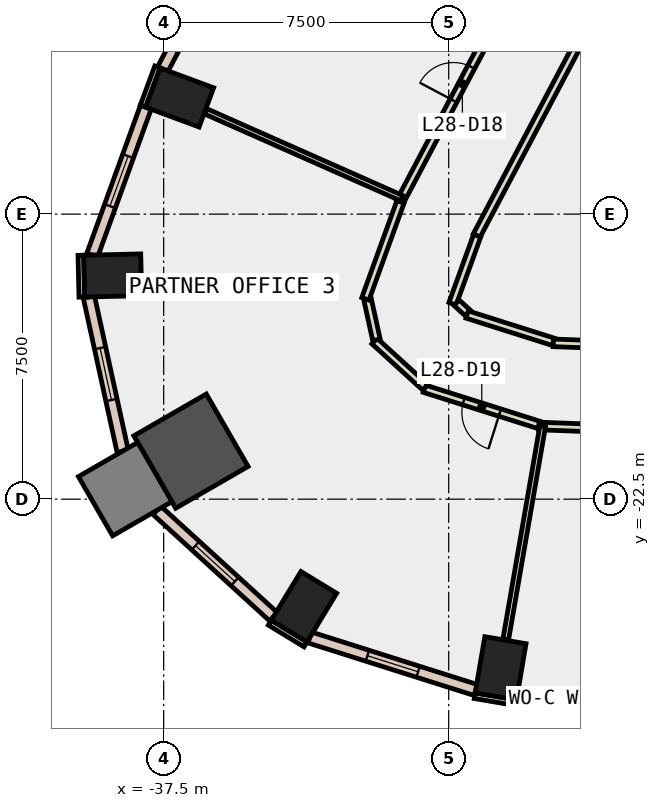
"""IFC4 building model, lengths in metres.
Left out: names, types, materials, properties, quantities, classifications, styles, units other than length and angle.
Written with IfcOpenShell. Run it as: python <this file> out.ifc"""

import sys

from ifc_helpers import new_model, si_unit, direction, frame, frame_2d, origin, origin_2d, place, context, subcontext, project, spatial, rectangle, extrude, element, fill, save


model = new_model("IFC4")
c1 = context("Model", 3, precision=1e-05, world=origin(), true_north=direction((0.0, 1.0)))
c2 = subcontext(c1, "Body", "Model", "MODEL_VIEW")
j1 = project(units=[si_unit("LENGTHUNIT", "METRE"), si_unit("PLANEANGLEUNIT", "RADIAN")], contexts=[c1])
p1 = place(None, origin())
s1 = spatial("IfcSite", under=j1, at=p1, CompositionType="ELEMENT")
p2 = place(p1, origin())
s2 = spatial("IfcBuilding", under=s1, at=p2, CompositionType="ELEMENT")
p3 = place(p2, frame((0.0, 0.0, 128.6)))
s3 = spatial("IfcBuildingStorey", under=s2, at=p3, CompositionType="ELEMENT", Elevation=128.6)
for number, where, z_axis, x_axis in (
    (1, (-28.633, -26.95, -0.4), (0.0, 0.0, 1.0), (-0.986, 0.168, 0.0)),
    (2, (-37.08, -11.931, -0.4), (0.0, 0.0, 1.0), (0.347, 0.938, 0.0)),
    (3, (-38.841, -16.614, -0.4), (0.0, 0.0, 1.0), (-0.023, 1.0, 0.0)),
):
    element("IfcColumn", number, at=place(p3, frame(where, z_axis=z_axis, x_axis=x_axis)), inside=s3, PredefinedType="COLUMN", context=c2, shape_type="SweptSolid", body=[
        extrude(rectangle(XDim=1.1, YDim=1.5, at=origin_2d()), origin(), (0.0, 0.0, 1.0), 4.0),
    ])
p4 = place(p3, frame((-36.781, -21.236, -0.4), z_axis=(0.0, 0.0, 1.0), x_axis=(0.866025403784, 0.5, 0.0)))
e4 = element("IfcColumn", 4, at=p4, inside=s3, PredefinedType="COLUMN", context=c2, shape_type="SweptSolid", body=[
    extrude(rectangle(XDim=2.2, YDim=2.2, at=origin_2d()), origin(), (0.0, 0.0, 1.0), 4.0),
])
p5 = place(p3, frame((-33.808, -25.331, -0.4), z_axis=(0.0, 0.0, 1.0), x_axis=(-0.854095929175, 0.520115510024, 0.0)))
e5 = element("IfcColumn", 5, at=p5, inside=s3, PredefinedType="COLUMN", context=c2, shape_type="SweptSolid", body=[
    extrude(rectangle(XDim=1.1, YDim=1.5, at=origin_2d()), origin(), (0.0, 0.0, 1.0), 4.0),
])
p6 = place(p3, frame((-38.513, -22.236, -0.4), z_axis=(0.0, 0.0, 1.0), x_axis=(0.866025403784, 0.5, 0.0)))
e6 = element("IfcColumn", 6, at=p6, inside=s3, PredefinedType="COLUMN", context=c2, shape_type="SweptSolid", body=[
    extrude(rectangle(XDim=1.8, YDim=1.8, at=origin_2d()), origin(), (0.0, 0.0, 1.0), 4.0),
])
p7 = place(p3, frame((-37.663, -11.128, 0.0), z_axis=(0.0, 0.0, 1.0), x_axis=(-0.347010833361, -0.937861120598, 0.0)))
e7 = element("IfcWall", 7, at=p7, inside=s3, PredefinedType="STANDARD", context=c2, shape_type="SweptSolid", body=[
    extrude(rectangle(XDim=1.1, YDim=0.15, at=frame_2d((0.55, 0.0))), origin(), (0.0, 0.0, 1.0), 3.6),
])
p8 = place(p3, frame((-29.314, -27.671, 0.0), z_axis=(0.0, 0.0, 1.0), x_axis=(0.985763338892, -0.168138751323, 0.0)))
e8 = element("IfcWall", 8, at=p8, inside=s3, PredefinedType="STANDARD", context=c2, shape_type="SweptSolid", body=[
    extrude(rectangle(XDim=1.101, YDim=0.15, at=frame_2d((0.55, 0.0))), origin(), (0.0, 0.0, 1.0), 3.6),
])
for number, where, z_axis, x_axis in (
    (9, (-39.679, -16.083, 0.0), (0.0, 0.0, 1.0), (0.024, -1.0, 0.0)),
    (10, (-34.707, -25.75, 0.0), (0.0, 0.0, 1.0), (0.854, -0.52, 0.0)),
):
    element("IfcWall", number, at=place(p3, frame(where, z_axis=z_axis, x_axis=x_axis)), inside=s3, PredefinedType="STANDARD", context=c2, shape_type="SweptSolid", body=[
        extrude(rectangle(XDim=1.1, YDim=0.15, at=frame_2d((0.55, 0.0))), origin(), (0.0, 0.0, 1.0), 3.6),
    ])
p9 = place(p3, frame((-28.205, -27.708, 0.0), z_axis=(0.0, 0.0, 1.0), x_axis=(0.999317846462, -0.036930228031, 0.0)))
e11 = element("IfcWall", 11, at=p9, inside=s3, PredefinedType="STANDARD", context=c2, shape_type="SweptSolid", body=[
    extrude(rectangle(XDim=5.877, YDim=0.3, at=frame_2d((2.938, 0.0))), origin(), (0.0, 0.0, 1.0), 3.6),
])
p10 = place(p9, frame((0.469, 0.0, 0.9)))
e12 = element("IfcOpeningElement", 12, at=p10, cuts=e11, PredefinedType="OPENING", context=c2, shape_type="SweptSolid", body=[
    extrude(rectangle(XDim=2.0, YDim=2.6, at=frame_2d((1.0, 1.3))), frame((0.0, 0.16, 0.0), z_axis=(0.0, -1.0, 0.0), x_axis=(1.0, 0.0, 0.0)), (0.0, 0.0, 1.0), 0.32),
])
p11 = place(p9, frame((3.408, 0.0, 0.9)))
e13 = element("IfcOpeningElement", 13, at=p11, cuts=e11, PredefinedType="OPENING", context=c2, shape_type="SweptSolid", body=[
    extrude(rectangle(XDim=2.0, YDim=2.6, at=frame_2d((1.0, 1.3))), frame((0.0, 0.16, 0.0), z_axis=(0.0, -1.0, 0.0), x_axis=(1.0, 0.0, 0.0)), (0.0, 0.0, 1.0), 0.32),
])
p12 = place(p3, frame((-34.593, -5.643, 0.0), z_axis=(0.0, 0.0, 1.0), x_axis=(-0.467654949391, -0.883911108828, 0.0)))
e14 = element("IfcWall", 14, at=p12, inside=s3, PredefinedType="STANDARD", context=c2, shape_type="SweptSolid", body=[
    extrude(rectangle(XDim=6.265, YDim=0.3, at=frame_2d((3.133, 0.0))), origin(), (0.0, 0.0, 1.0), 3.6),
])
p13 = place(p12, frame((0.566, 0.0, 0.9)))
e15 = element("IfcOpeningElement", 15, at=p13, cuts=e14, PredefinedType="OPENING", context=c2, shape_type="SweptSolid", body=[
    extrude(rectangle(XDim=2.0, YDim=2.6, at=frame_2d((1.0, 1.3))), frame((0.0, 0.16, 0.0), z_axis=(0.0, -1.0, 0.0), x_axis=(1.0, 0.0, 0.0)), (0.0, 0.0, 1.0), 0.32),
])
p14 = place(p12, frame((3.699, 0.0, 0.9)))
e16 = element("IfcOpeningElement", 16, at=p14, cuts=e14, PredefinedType="OPENING", context=c2, shape_type="SweptSolid", body=[
    extrude(rectangle(XDim=2.0, YDim=2.6, at=frame_2d((1.0, 1.3))), frame((0.0, 0.16, 0.0), z_axis=(0.0, -1.0, 0.0), x_axis=(1.0, 0.0, 0.0)), (0.0, 0.0, 1.0), 0.32),
])
p15 = place(p3, frame((-37.97, -12.186, 0.0), z_axis=(0.0, 0.0, 1.0), x_axis=(-0.340477955209, -0.940252499075, 0.0)))
e17 = element("IfcWall", 17, at=p15, inside=s3, PredefinedType="STANDARD", context=c2, shape_type="SweptSolid", body=[
    extrude(rectangle(XDim=4.138, YDim=0.3, at=frame_2d((2.069, 0.0))), origin(), (0.0, 0.0, 1.0), 3.6),
])
p16 = place(p15, frame((1.369, 0.0, 0.9)))
e18 = element("IfcOpeningElement", 18, at=p16, cuts=e17, PredefinedType="OPENING", context=c2, shape_type="SweptSolid", body=[
    extrude(rectangle(XDim=1.4, YDim=2.6, at=frame_2d((0.7, 1.3))), frame((0.0, 0.16, 0.0), z_axis=(0.0, -1.0, 0.0), x_axis=(1.0, 0.0, 0.0)), (0.0, 0.0, 1.0), 0.32),
])
p17 = place(p3, frame((-39.468, -17.178, 0.0), z_axis=(0.0, 0.0, 1.0), x_axis=(0.2139737857, -0.976839402887, 0.0)))
e19 = element("IfcWall", 19, at=p17, inside=s3, PredefinedType="STANDARD", context=c2, shape_type="SweptSolid", body=[
    extrude(rectangle(XDim=4.154, YDim=0.3, at=frame_2d((2.077, 0.0))), origin(), (0.0, 0.0, 1.0), 3.6),
])
p18 = place(p17, frame((1.377, 0.0, 0.9)))
e20 = element("IfcOpeningElement", 20, at=p18, cuts=e19, PredefinedType="OPENING", context=c2, shape_type="SweptSolid", body=[
    extrude(rectangle(XDim=1.4, YDim=2.6, at=frame_2d((0.7, 1.3))), frame((0.0, 0.16, 0.0), z_axis=(0.0, -1.0, 0.0), x_axis=(1.0, 0.0, 0.0)), (0.0, 0.0, 1.0), 0.32),
])
p19 = place(p3, frame((-37.68, -22.793, 0.0), z_axis=(0.0, 0.0, 1.0), x_axis=(0.738825046606, -0.673897284835, 0.0)))
e21 = element("IfcWall", 21, at=p19, inside=s3, PredefinedType="STANDARD", context=c2, shape_type="SweptSolid", body=[
    extrude(rectangle(XDim=4.155, YDim=0.3, at=frame_2d((2.078, 0.0))), origin(), (0.0, 0.0, 1.0), 3.6),
])
p20 = place(p19, frame((1.378, 0.0, 0.9)))
e22 = element("IfcOpeningElement", 22, at=p20, cuts=e21, PredefinedType="OPENING", context=c2, shape_type="SweptSolid", body=[
    extrude(rectangle(XDim=1.4, YDim=2.6, at=frame_2d((0.7, 1.3))), frame((0.0, 0.16, 0.0), z_axis=(0.0, -1.0, 0.0), x_axis=(1.0, 0.0, 0.0)), (0.0, 0.0, 1.0), 0.32),
])
p21 = place(p3, frame((-33.657, -26.139, 0.0), z_axis=(0.0, 0.0, 1.0), x_axis=(0.953449736988, -0.301551983971, 0.0)))
e23 = element("IfcWall", 23, at=p21, inside=s3, PredefinedType="STANDARD", context=c2, shape_type="SweptSolid", body=[
    extrude(rectangle(XDim=4.583, YDim=0.3, at=frame_2d((2.292, 0.0))), origin(), (0.0, 0.0, 1.0), 3.6),
])
p22 = place(p21, frame((1.592, 0.0, 0.9)))
e24 = element("IfcOpeningElement", 24, at=p22, cuts=e23, PredefinedType="OPENING", context=c2, shape_type="SweptSolid", body=[
    extrude(rectangle(XDim=1.4, YDim=2.6, at=frame_2d((0.7, 1.3))), frame((0.0, 0.16, 0.0), z_axis=(0.0, -1.0, 0.0), x_axis=(1.0, 0.0, 0.0)), (0.0, 0.0, 1.0), 0.32),
])
p23 = place(p3, frame((-26.095, -9.574, 0.0), z_axis=(0.0, 0.0, 1.0), x_axis=(-0.467631129673, -0.883923710826, 0.0)))
e25 = element("IfcWall", 25, at=p23, inside=s3, PredefinedType="PARTITIONING", context=c2, shape_type="SweptSolid", body=[
    extrude(rectangle(XDim=6.777, YDim=0.2, at=frame_2d((3.388, 0.0))), origin(), (0.0, 0.0, 1.0), 3.6),
])
p24 = place(p3, frame((-29.251, -15.569, 0.0), z_axis=(0.0, 0.0, 1.0), x_axis=(-0.340403936609, -0.940279298901, 0.0)))
e26 = element("IfcWall", 26, at=p24, inside=s3, PredefinedType="PARTITIONING", context=c2, shape_type="SweptSolid", body=[
    extrude(rectangle(XDim=1.904, YDim=0.2, at=frame_2d((0.952, 0.0))), origin(), (0.0, 0.0, 1.0), 3.6),
])
p25 = place(p3, frame((-29.792, -17.332, 0.0), z_axis=(0.0, 0.0, 1.0), x_axis=(0.738629069284, -0.674112081192, 0.0)))
e27 = element("IfcWall", 27, at=p25, inside=s3, PredefinedType="PARTITIONING", context=c2, shape_type="SweptSolid", body=[
    extrude(rectangle(XDim=0.405, YDim=0.2, at=frame_2d((0.202, 0.0))), origin(), (0.0, 0.0, 1.0), 3.6),
])
p26 = place(p3, frame((-29.514, -17.642, 0.0), z_axis=(0.0, 0.0, 1.0), x_axis=(0.953398231748, -0.301714785353, 0.0)))
e28 = element("IfcWall", 28, at=p26, inside=s3, PredefinedType="PARTITIONING", context=c2, shape_type="SweptSolid", body=[
    extrude(rectangle(XDim=2.383, YDim=0.2, at=frame_2d((1.191, 0.0))), origin(), (0.0, 0.0, 1.0), 3.6),
])
p27 = place(p3, frame((-27.247, -18.387, 0.0), z_axis=(0.0, 0.0, 1.0), x_axis=(0.999316109669, -0.036977195089, 0.0)))
e29 = element("IfcWall", 29, at=p27, inside=s3, PredefinedType="PARTITIONING", context=c2, shape_type="SweptSolid", body=[
    extrude(rectangle(XDim=5.764, YDim=0.2, at=frame_2d((2.882, 0.0))), origin(), (0.0, 0.0, 1.0), 3.6),
])
p28 = place(p3, frame((-31.28, -14.67, 0.0), z_axis=(0.0, 0.0, 1.0), x_axis=(0.4676622466, 0.883907248022, 0.0)))
e30 = element("IfcWall", 30, at=p28, inside=s3, PredefinedType="PARTITIONING", context=c2, shape_type="SweptSolid", body=[
    extrude(rectangle(XDim=6.866, YDim=0.2, at=frame_2d((3.433, 0.0))), origin(), (0.0, 0.0, 1.0), 3.6),
])
p29 = place(p28, frame((3.008, 0.0, 0.0)))
e31 = element("IfcOpeningElement", 31, at=p29, cuts=e30, PredefinedType="OPENING", context=c2, shape_type="SweptSolid", body=[
    extrude(rectangle(XDim=1.0, YDim=2.1, at=frame_2d((0.5, 1.05))), frame((0.0, 0.11, 0.0), z_axis=(0.0, -1.0, 0.0), x_axis=(1.0, 0.0, 0.0)), (0.0, 0.0, 1.0), 0.22),
])
p30 = place(p3, frame((-27.621, -20.548, 0.0), z_axis=(0.0, 0.0, 1.0), x_axis=(-0.953482354465, 0.301448834338, 0.0)))
e32 = element("IfcWall", 32, at=p30, inside=s3, PredefinedType="PARTITIONING", context=c2, shape_type="SweptSolid", body=[
    extrude(rectangle(XDim=3.165, YDim=0.2, at=frame_2d((1.583, 0.0))), origin(), (0.0, 0.0, 1.0), 3.6),
])
p31 = place(p30, frame((1.082, 0.0, 0.0)))
e33 = element("IfcOpeningElement", 33, at=p31, cuts=e32, PredefinedType="OPENING", context=c2, shape_type="SweptSolid", body=[
    extrude(rectangle(XDim=1.0, YDim=2.1, at=frame_2d((0.5, 1.05))), frame((0.0, 0.11, 0.0), z_axis=(0.0, -1.0, 0.0), x_axis=(1.0, 0.0, 0.0)), (0.0, 0.0, 1.0), 0.22),
])
p32 = place(p3, frame((-30.617, -19.557, 0.0), z_axis=(0.0, 0.0, 1.0), x_axis=(-0.739034946694, 0.673667089567, 0.0)))
e34 = element("IfcWall", 34, at=p32, inside=s3, PredefinedType="PARTITIONING", context=c2, shape_type="SweptSolid", body=[
    extrude(rectangle(XDim=1.808, YDim=0.2, at=frame_2d((0.904, 0.0))), origin(), (0.0, 0.0, 1.0), 3.6),
])
p33 = place(p3, frame((-31.901, -18.308, 0.0), z_axis=(0.0, 0.0, 1.0), x_axis=(-0.214278387947, 0.976772630891, 0.0)))
e35 = element("IfcWall", 35, at=p33, inside=s3, PredefinedType="PARTITIONING", context=c2, shape_type="SweptSolid", body=[
    extrude(rectangle(XDim=1.102, YDim=0.2, at=frame_2d((0.551, 0.0))), origin(), (0.0, 0.0, 1.0), 3.6),
])
p34 = place(p3, frame((-32.192, -17.229, 0.0), z_axis=(0.0, 0.0, 1.0), x_axis=(0.340269739222, 0.940327870782, 0.0)))
e36 = element("IfcWall", 36, at=p34, inside=s3, PredefinedType="PARTITIONING", context=c2, shape_type="SweptSolid", body=[
    extrude(rectangle(XDim=2.715, YDim=0.2, at=frame_2d((1.357, 0.0))), origin(), (0.0, 0.0, 1.0), 3.6),
])
p35 = place(p3, frame((-21.557, -20.799, 0.0), z_axis=(0.0, 0.0, 1.0), x_axis=(-0.99931884782, 0.036903121698, 0.0)))
e37 = element("IfcWall", 37, at=p35, inside=s3, PredefinedType="PARTITIONING", context=c2, shape_type="SweptSolid", body=[
    extrude(rectangle(XDim=6.073, YDim=0.2, at=frame_2d((3.037, 0.0))), origin(), (0.0, 0.0, 1.0), 3.6),
])
p36 = place(p3, frame((-31.233, -14.582, 0.0), z_axis=(0.0, 0.0, 1.0), x_axis=(-0.914317360249, 0.404998474994, 0.0)))
e38 = element("IfcWall", 38, at=p36, inside=s3, PredefinedType="PARTITIONING", context=c2, shape_type="SweptSolid", body=[
    extrude(rectangle(XDim=5.645, YDim=0.15, at=frame_2d((2.822, 0.0))), origin(), (0.0, 0.0, 1.0), 3.6),
])
p37 = place(p3, frame((-27.526, -20.578, 0.0), z_axis=(0.0, 0.0, 1.0), x_axis=(-0.170795043313, -0.985306578269, 0.0)))
e39 = element("IfcWall", 39, at=p37, inside=s3, PredefinedType="PARTITIONING", context=c2, shape_type="SweptSolid", body=[
    extrude(rectangle(XDim=5.698, YDim=0.15, at=frame_2d((2.849, 0.0))), origin(), (0.0, 0.0, 1.0), 3.6),
])
p38 = place(p10, origin())
e40 = element("IfcWindow", 40, at=p38, inside=s3, PartitioningType="SINGLE_PANEL", PredefinedType="WINDOW", context=c2, shape_type="SweptSolid", body=[
    extrude(rectangle(XDim=2.0, YDim=2.6, at=frame_2d((1.0, 1.3))), frame((0.0, 0.03, 0.0), z_axis=(0.0, -1.0, 0.0), x_axis=(1.0, 0.0, 0.0)), (0.0, 0.0, 1.0), 0.06),
])
fill(e12, e40)
p39 = place(p16, origin())
e41 = element("IfcWindow", 41, at=p39, inside=s3, PartitioningType="SINGLE_PANEL", PredefinedType="WINDOW", context=c2, shape_type="SweptSolid", body=[
    extrude(rectangle(XDim=1.4, YDim=2.6, at=frame_2d((0.7, 1.3))), frame((0.0, 0.03, 0.0), z_axis=(0.0, -1.0, 0.0), x_axis=(1.0, 0.0, 0.0)), (0.0, 0.0, 1.0), 0.06),
])
fill(e18, e41)
p40 = place(p18, origin())
e42 = element("IfcWindow", 42, at=p40, inside=s3, PartitioningType="SINGLE_PANEL", PredefinedType="WINDOW", context=c2, shape_type="SweptSolid", body=[
    extrude(rectangle(XDim=1.4, YDim=2.6, at=frame_2d((0.7, 1.3))), frame((0.0, 0.03, 0.0), z_axis=(0.0, -1.0, 0.0), x_axis=(1.0, 0.0, 0.0)), (0.0, 0.0, 1.0), 0.06),
])
fill(e20, e42)
p41 = place(p20, origin())
e43 = element("IfcWindow", 43, at=p41, inside=s3, PartitioningType="SINGLE_PANEL", PredefinedType="WINDOW", context=c2, shape_type="SweptSolid", body=[
    extrude(rectangle(XDim=1.4, YDim=2.6, at=frame_2d((0.7, 1.3))), frame((0.0, 0.03, 0.0), z_axis=(0.0, -1.0, 0.0), x_axis=(1.0, 0.0, 0.0)), (0.0, 0.0, 1.0), 0.06),
])
fill(e22, e43)
p42 = place(p22, origin())
e44 = element("IfcWindow", 44, at=p42, inside=s3, PartitioningType="SINGLE_PANEL", PredefinedType="WINDOW", context=c2, shape_type="SweptSolid", body=[
    extrude(rectangle(XDim=1.4, YDim=2.6, at=frame_2d((0.7, 1.3))), frame((0.0, 0.03, 0.0), z_axis=(0.0, -1.0, 0.0), x_axis=(1.0, 0.0, 0.0)), (0.0, 0.0, 1.0), 0.06),
])
fill(e24, e44)
p43 = place(p29, origin())
e45 = element("IfcDoor", 45, at=p43, inside=s3, OperationType="SINGLE_SWING_LEFT", PredefinedType="DOOR", context=c2, shape_type="SweptSolid", body=[
    extrude(rectangle(XDim=1.0, YDim=2.1, at=frame_2d((0.5, 1.05))), frame((0.0, 0.025, 0.0), z_axis=(0.0, -1.0, 0.0), x_axis=(1.0, 0.0, 0.0)), (0.0, 0.0, 1.0), 0.05),
])
fill(e31, e45)
p44 = place(p31, origin())
e46 = element("IfcDoor", 46, at=p44, inside=s3, OperationType="SINGLE_SWING_RIGHT", PredefinedType="DOOR", context=c2, shape_type="SweptSolid", body=[
    extrude(rectangle(XDim=1.0, YDim=2.1, at=frame_2d((0.5, 1.05))), frame((0.0, 0.025, 0.0), z_axis=(0.0, -1.0, 0.0), x_axis=(1.0, 0.0, 0.0)), (0.0, 0.0, 1.0), 0.05),
])
fill(e33, e46)
save(model, sys.argv[1])
